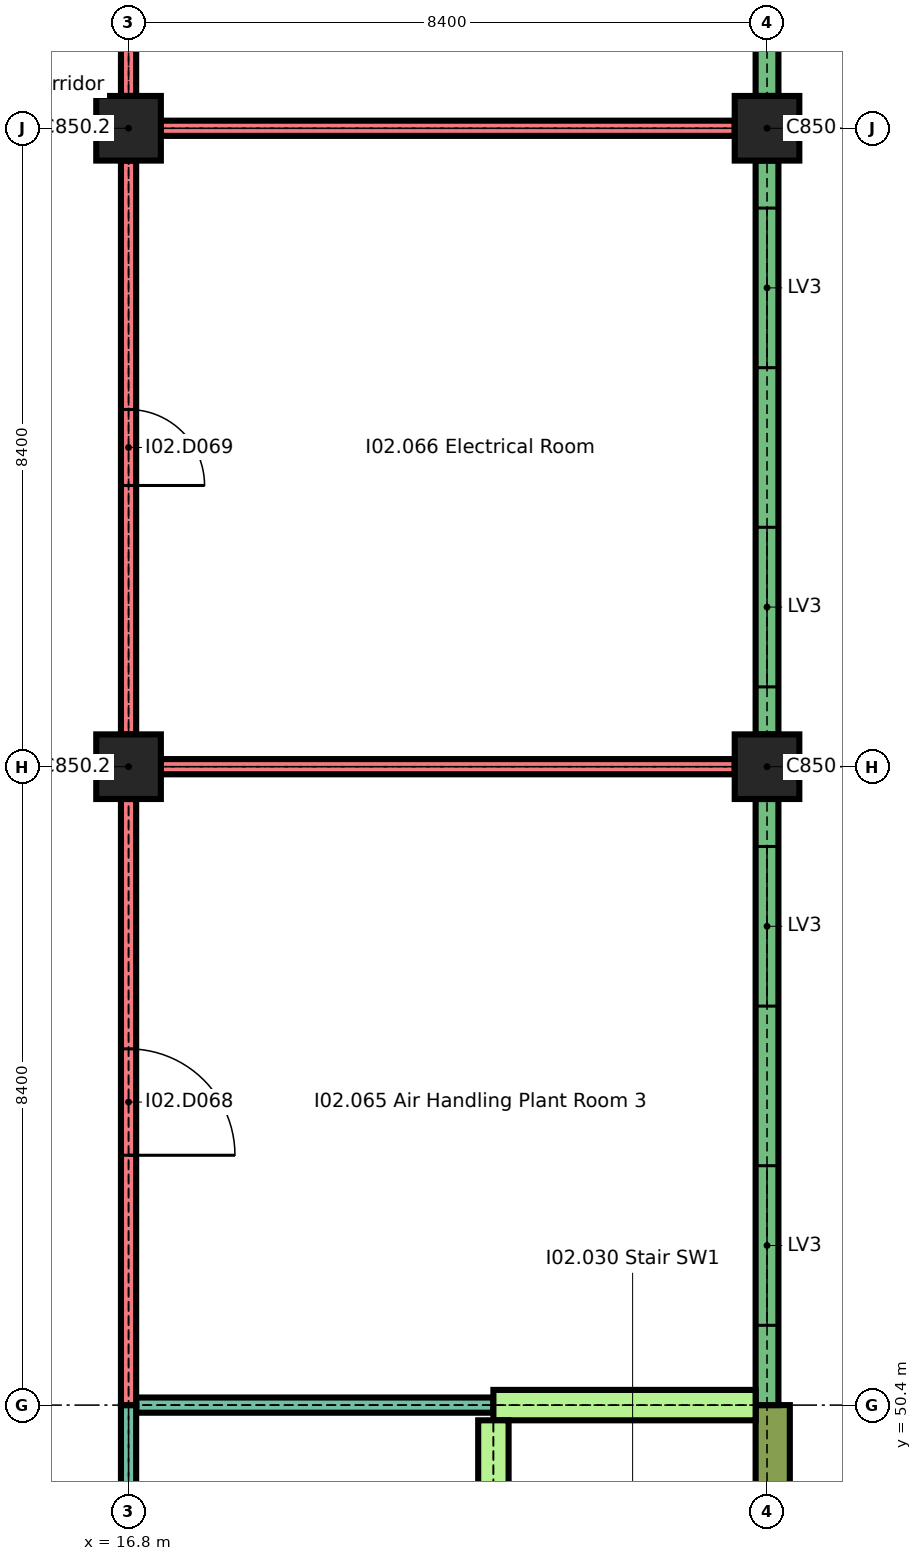
"""IFC4 building model, lengths in metres.
Left out: names, types, materials, properties, quantities, classifications, styles, units other than length and angle.
Written with IfcOpenShell. Run it as: python <this file> out.ifc"""

import sys

from ifc_helpers import new_model, si_unit, direction, frame, frame_2d, origin, origin_2d, place, context, subcontext, project, spatial, rectangle, extrude, element, fill, save


model = new_model("IFC4")
c1 = context("Model", 3, precision=1e-05, world=origin(), true_north=direction((0.0, 1.0)))
c2 = subcontext(c1, "Body", "Model", "MODEL_VIEW")
j1 = project(units=[si_unit("LENGTHUNIT", "METRE"), si_unit("PLANEANGLEUNIT", "RADIAN")], contexts=[c1])
p1 = place(None, origin())
s1 = spatial("IfcSite", under=j1, at=p1, CompositionType="ELEMENT")
p2 = place(p1, origin())
s2 = spatial("IfcBuilding", under=s1, at=p2, CompositionType="ELEMENT")
p3 = place(p2, frame((0.0, 0.0, 12.9)))
s3 = spatial("IfcBuildingStorey", under=s2, at=p3, CompositionType="ELEMENT", Elevation=12.9)
for number, where, z_axis, x_axis in (
    (1, (16.8, 58.8, 0.0), (0.0, 0.0, 1.0), (1.0, 0.0, 0.0)),
    (2, (25.2, 58.8, 0.0), (0.0, 0.0, 1.0), (1.0, 0.0, 0.0)),
    (3, (16.8, 67.2, 0.0), (0.0, 0.0, 1.0), (1.0, 0.0, 0.0)),
    (4, (25.2, 67.2, 0.0), (0.0, 0.0, 1.0), (1.0, 0.0, 0.0)),
):
    element("IfcColumn", number, at=place(p3, frame(where, z_axis=z_axis, x_axis=x_axis)), inside=s3, PredefinedType="COLUMN", context=c2, shape_type="SweptSolid", body=[
        extrude(rectangle(XDim=0.85, YDim=0.85, at=origin_2d()), origin(), (0.0, 0.0, 1.0), 2.04),
    ])
p4 = place(p3, frame((25.275, 46.55, 0.0), z_axis=(0.0, 0.0, 1.0), x_axis=(0.0, 1.0, 0.0)))
e5 = element("IfcWall", 5, at=p4, inside=s3, PredefinedType="SOLIDWALL", context=c2, shape_type="SweptSolid", body=[
    extrude(rectangle(XDim=3.85, YDim=0.45, at=frame_2d((1.925, 0.0))), origin(), (0.0, 0.0, 1.0), 2.04),
])
p5 = place(p3, frame((25.2, 50.4, 0.0), z_axis=(0.0, 0.0, 1.0), x_axis=(0.0, 1.0, 0.0)))
e6 = element("IfcWall", 6, at=p5, inside=s3, PredefinedType="SOLIDWALL", context=c2, shape_type="SweptSolid", body=[
    extrude(rectangle(XDim=7.975, YDim=0.3, at=frame_2d((3.988, 0.0))), origin(), (0.0, 0.0, 1.0), 1.74),
])
p6 = place(p5, frame((1.05, 0.0, 0.6)))
e7 = element("IfcOpeningElement", 7, at=p6, cuts=e6, PredefinedType="OPENING", context=c2, shape_type="SweptSolid", body=[
    extrude(rectangle(XDim=2.1, YDim=1.05, at=frame_2d((1.05, 0.525))), frame((0.0, 0.16, 0.0), z_axis=(0.0, -1.0, 0.0), x_axis=(1.0, 0.0, 0.0)), (0.0, 0.0, 1.0), 0.32),
])
p7 = place(p5, frame((5.25, 0.0, 0.6)))
e8 = element("IfcOpeningElement", 8, at=p7, cuts=e6, PredefinedType="OPENING", context=c2, shape_type="SweptSolid", body=[
    extrude(rectangle(XDim=2.1, YDim=1.05, at=frame_2d((1.05, 0.525))), frame((0.0, 0.16, 0.0), z_axis=(0.0, -1.0, 0.0), x_axis=(1.0, 0.0, 0.0)), (0.0, 0.0, 1.0), 0.32),
])
p8 = place(p3, frame((25.2, 59.225, 0.0), z_axis=(0.0, 0.0, 1.0), x_axis=(0.0, 1.0, 0.0)))
e9 = element("IfcWall", 9, at=p8, inside=s3, PredefinedType="SOLIDWALL", context=c2, shape_type="SweptSolid", body=[
    extrude(rectangle(XDim=7.55, YDim=0.3, at=frame_2d((3.775, 0.0))), origin(), (0.0, 0.0, 1.0), 1.74),
])
p9 = place(p8, frame((0.625, 0.0, 0.6)))
e10 = element("IfcOpeningElement", 10, at=p9, cuts=e9, PredefinedType="OPENING", context=c2, shape_type="SweptSolid", body=[
    extrude(rectangle(XDim=2.1, YDim=1.05, at=frame_2d((1.05, 0.525))), frame((0.0, 0.16, 0.0), z_axis=(0.0, -1.0, 0.0), x_axis=(1.0, 0.0, 0.0)), (0.0, 0.0, 1.0), 0.32),
])
p10 = place(p8, frame((4.825, 0.0, 0.6)))
e11 = element("IfcOpeningElement", 11, at=p10, cuts=e9, PredefinedType="OPENING", context=c2, shape_type="SweptSolid", body=[
    extrude(rectangle(XDim=2.1, YDim=1.05, at=frame_2d((1.05, 0.525))), frame((0.0, 0.16, 0.0), z_axis=(0.0, -1.0, 0.0), x_axis=(1.0, 0.0, 0.0)), (0.0, 0.0, 1.0), 0.32),
])
p11 = place(p3, frame((25.2, 67.625, 0.0), z_axis=(0.0, 0.0, 1.0), x_axis=(0.0, 1.0, 0.0)))
e12 = element("IfcWall", 12, at=p11, inside=s3, PredefinedType="SOLIDWALL", context=c2, shape_type="SweptSolid", body=[
    extrude(rectangle(XDim=7.975, YDim=0.3, at=frame_2d((3.988, 0.0))), origin(), (0.0, 0.0, 1.0), 1.74),
])
p12 = place(p11, frame((0.625, 0.0, 0.6)))
e13 = element("IfcOpeningElement", 13, at=p12, cuts=e12, PredefinedType="OPENING", context=c2, shape_type="SweptSolid", body=[
    extrude(rectangle(XDim=2.1, YDim=1.05, at=frame_2d((1.05, 0.525))), frame((0.0, 0.16, 0.0), z_axis=(0.0, -1.0, 0.0), x_axis=(1.0, 0.0, 0.0)), (0.0, 0.0, 1.0), 0.32),
])
p13 = place(p11, frame((4.825, 0.0, 0.6)))
e14 = element("IfcOpeningElement", 14, at=p13, cuts=e12, PredefinedType="OPENING", context=c2, shape_type="SweptSolid", body=[
    extrude(rectangle(XDim=2.1, YDim=1.05, at=frame_2d((1.05, 0.525))), frame((0.0, 0.16, 0.0), z_axis=(0.0, -1.0, 0.0), x_axis=(1.0, 0.0, 0.0)), (0.0, 0.0, 1.0), 0.32),
])
p14 = place(p3, frame((16.9, 50.4, 0.0), z_axis=(0.0, 0.0, 1.0), x_axis=(1.0, 0.0, 0.0)))
e15 = element("IfcWall", 15, at=p14, inside=s3, PredefinedType="PARTITIONING", context=c2, shape_type="SweptSolid", body=[
    extrude(rectangle(XDim=4.7, YDim=0.2, at=frame_2d((2.35, 0.0))), origin(), (0.0, 0.0, 1.0), 2.04),
])
p15 = place(p3, frame((21.6, 50.4, 0.0), z_axis=(0.0, 0.0, 1.0), x_axis=(1.0, 0.0, 0.0)))
e16 = element("IfcWall", 16, at=p15, inside=s3, PredefinedType="SHEAR", context=c2, shape_type="SweptSolid", body=[
    extrude(rectangle(XDim=3.45, YDim=0.4, at=frame_2d((1.725, 0.0))), origin(), (0.0, 0.0, 1.0), 2.04),
])
for number, where, z_axis, x_axis in (
    (17, (17.225, 58.8, 0.0), (0.0, 0.0, 1.0), (1.0, 0.0, 0.0)),
    (18, (17.225, 67.2, 0.0), (0.0, 0.0, 1.0), (1.0, 0.0, 0.0)),
):
    element("IfcWall", number, at=place(p3, frame(where, z_axis=z_axis, x_axis=x_axis)), inside=s3, PredefinedType="SOLIDWALL", context=c2, shape_type="SweptSolid", body=[
        extrude(rectangle(XDim=7.55, YDim=0.2, at=frame_2d((3.775, 0.0))), origin(), (0.0, 0.0, 1.0), 2.04),
    ])
p16 = place(p3, frame((16.8, 42.0, 0.0), z_axis=(0.0, 0.0, 1.0), x_axis=(0.0, 1.0, 0.0)))
e19 = element("IfcWall", 19, at=p16, inside=s3, PredefinedType="PARTITIONING", context=c2, shape_type="SweptSolid", body=[
    extrude(rectangle(XDim=8.4, YDim=0.2, at=frame_2d((4.2, 0.0))), origin(), (0.0, 0.0, 1.0), 2.04),
])
p17 = place(p16, frame((3.5, 0.0, 0.0)))
e20 = element("IfcOpeningElement", 20, at=p17, cuts=e19, PredefinedType="OPENING", context=c2, shape_type="SweptSolid", body=[
    extrude(rectangle(XDim=1.4, YDim=2.0, at=frame_2d((0.7, 1.0))), frame((0.0, 0.11, 0.0), z_axis=(0.0, -1.0, 0.0), x_axis=(1.0, 0.0, 0.0)), (0.0, 0.0, 1.0), 0.22),
])
p18 = place(p3, frame((16.8, 50.4, 0.0), z_axis=(0.0, 0.0, 1.0), x_axis=(0.0, 1.0, 0.0)))
e21 = element("IfcWall", 21, at=p18, inside=s3, PredefinedType="SOLIDWALL", context=c2, shape_type="SweptSolid", body=[
    extrude(rectangle(XDim=7.975, YDim=0.2, at=frame_2d((3.988, 0.0))), origin(), (0.0, 0.0, 1.0), 2.04),
])
p19 = place(p18, frame((3.288, 0.0, 0.0)))
e22 = element("IfcOpeningElement", 22, at=p19, cuts=e21, PredefinedType="OPENING", context=c2, shape_type="SweptSolid", body=[
    extrude(rectangle(XDim=1.4, YDim=2.0, at=frame_2d((0.7, 1.0))), frame((0.0, 0.11, 0.0), z_axis=(0.0, -1.0, 0.0), x_axis=(1.0, 0.0, 0.0)), (0.0, 0.0, 1.0), 0.22),
])
p20 = place(p3, frame((16.8, 59.225, 0.0), z_axis=(0.0, 0.0, 1.0), x_axis=(0.0, 1.0, 0.0)))
e23 = element("IfcWall", 23, at=p20, inside=s3, PredefinedType="SOLIDWALL", context=c2, shape_type="SweptSolid", body=[
    extrude(rectangle(XDim=7.55, YDim=0.2, at=frame_2d((3.775, 0.0))), origin(), (0.0, 0.0, 1.0), 2.04),
])
p21 = place(p20, frame((3.275, 0.0, 0.0)))
e24 = element("IfcOpeningElement", 24, at=p21, cuts=e23, PredefinedType="OPENING", context=c2, shape_type="SweptSolid", body=[
    extrude(rectangle(XDim=1.0, YDim=2.0, at=frame_2d((0.5, 1.0))), frame((0.0, 0.11, 0.0), z_axis=(0.0, -1.0, 0.0), x_axis=(1.0, 0.0, 0.0)), (0.0, 0.0, 1.0), 0.22),
])
p22 = place(p3, frame((16.8, 67.625, 0.0), z_axis=(0.0, 0.0, 1.0), x_axis=(0.0, 1.0, 0.0)))
e25 = element("IfcWall", 25, at=p22, inside=s3, PredefinedType="SOLIDWALL", context=c2, shape_type="SweptSolid", body=[
    extrude(rectangle(XDim=7.975, YDim=0.2, at=frame_2d((3.988, 0.0))), origin(), (0.0, 0.0, 1.0), 2.04),
])
p23 = place(p22, frame((3.488, 0.0, 0.0)))
e26 = element("IfcOpeningElement", 26, at=p23, cuts=e25, PredefinedType="OPENING", context=c2, shape_type="SweptSolid", body=[
    extrude(rectangle(XDim=1.0, YDim=2.0, at=frame_2d((0.5, 1.0))), frame((0.0, 0.11, 0.0), z_axis=(0.0, -1.0, 0.0), x_axis=(1.0, 0.0, 0.0)), (0.0, 0.0, 1.0), 0.22),
])
p24 = place(p3, frame((21.6, 42.2, 0.0), z_axis=(0.0, 0.0, 1.0), x_axis=(0.0, 1.0, 0.0)))
e27 = element("IfcWall", 27, at=p24, inside=s3, PredefinedType="SHEAR", context=c2, shape_type="SweptSolid", body=[
    extrude(rectangle(XDim=8.0, YDim=0.4, at=frame_2d((4.0, 0.0))), origin(), (0.0, 0.0, 1.0), 2.04),
])
p25 = place(p24, frame((0.4, 0.0, 0.0)))
e28 = element("IfcOpeningElement", 28, at=p25, cuts=e27, PredefinedType="OPENING", context=c2, shape_type="SweptSolid", body=[
    extrude(rectangle(XDim=1.2, YDim=2.0, at=frame_2d((0.6, 1.0))), frame((0.0, 0.21, 0.0), z_axis=(0.0, -1.0, 0.0), x_axis=(1.0, 0.0, 0.0)), (0.0, 0.0, 1.0), 0.42),
])
p26 = place(p6, origin())
e29 = element("IfcWindow", 29, at=p26, inside=s3, PartitioningType="SINGLE_PANEL", PredefinedType="WINDOW", context=c2, shape_type="SweptSolid", body=[
    extrude(rectangle(XDim=2.1, YDim=1.05, at=frame_2d((1.05, 0.525))), frame((0.0, 0.075, 0.0), z_axis=(0.0, -1.0, 0.0), x_axis=(1.0, 0.0, 0.0)), (0.0, 0.0, 1.0), 0.15),
])
fill(e7, e29)
p27 = place(p7, origin())
e30 = element("IfcWindow", 30, at=p27, inside=s3, PartitioningType="SINGLE_PANEL", PredefinedType="WINDOW", context=c2, shape_type="SweptSolid", body=[
    extrude(rectangle(XDim=2.1, YDim=1.05, at=frame_2d((1.05, 0.525))), frame((0.0, 0.075, 0.0), z_axis=(0.0, -1.0, 0.0), x_axis=(1.0, 0.0, 0.0)), (0.0, 0.0, 1.0), 0.15),
])
fill(e8, e30)
p28 = place(p9, origin())
e31 = element("IfcWindow", 31, at=p28, inside=s3, PartitioningType="SINGLE_PANEL", PredefinedType="WINDOW", context=c2, shape_type="SweptSolid", body=[
    extrude(rectangle(XDim=2.1, YDim=1.05, at=frame_2d((1.05, 0.525))), frame((0.0, 0.075, 0.0), z_axis=(0.0, -1.0, 0.0), x_axis=(1.0, 0.0, 0.0)), (0.0, 0.0, 1.0), 0.15),
])
fill(e10, e31)
p29 = place(p10, origin())
e32 = element("IfcWindow", 32, at=p29, inside=s3, PartitioningType="SINGLE_PANEL", PredefinedType="WINDOW", context=c2, shape_type="SweptSolid", body=[
    extrude(rectangle(XDim=2.1, YDim=1.05, at=frame_2d((1.05, 0.525))), frame((0.0, 0.075, 0.0), z_axis=(0.0, -1.0, 0.0), x_axis=(1.0, 0.0, 0.0)), (0.0, 0.0, 1.0), 0.15),
])
fill(e11, e32)
p30 = place(p19, origin())
e33 = element("IfcDoor", 33, at=p30, inside=s3, OperationType="SINGLE_SWING_LEFT", PredefinedType="DOOR", context=c2, shape_type="SweptSolid", body=[
    extrude(rectangle(XDim=1.4, YDim=2.0, at=frame_2d((0.7, 1.0))), frame((0.0, 0.025, 0.0), z_axis=(0.0, -1.0, 0.0), x_axis=(1.0, 0.0, 0.0)), (0.0, 0.0, 1.0), 0.05),
])
fill(e22, e33)
p31 = place(p21, origin())
e34 = element("IfcDoor", 34, at=p31, inside=s3, OperationType="SINGLE_SWING_LEFT", PredefinedType="DOOR", context=c2, shape_type="SweptSolid", body=[
    extrude(rectangle(XDim=1.0, YDim=2.0, at=frame_2d((0.5, 1.0))), frame((0.0, 0.025, 0.0), z_axis=(0.0, -1.0, 0.0), x_axis=(1.0, 0.0, 0.0)), (0.0, 0.0, 1.0), 0.05),
])
fill(e24, e34)
save(model, sys.argv[1])
